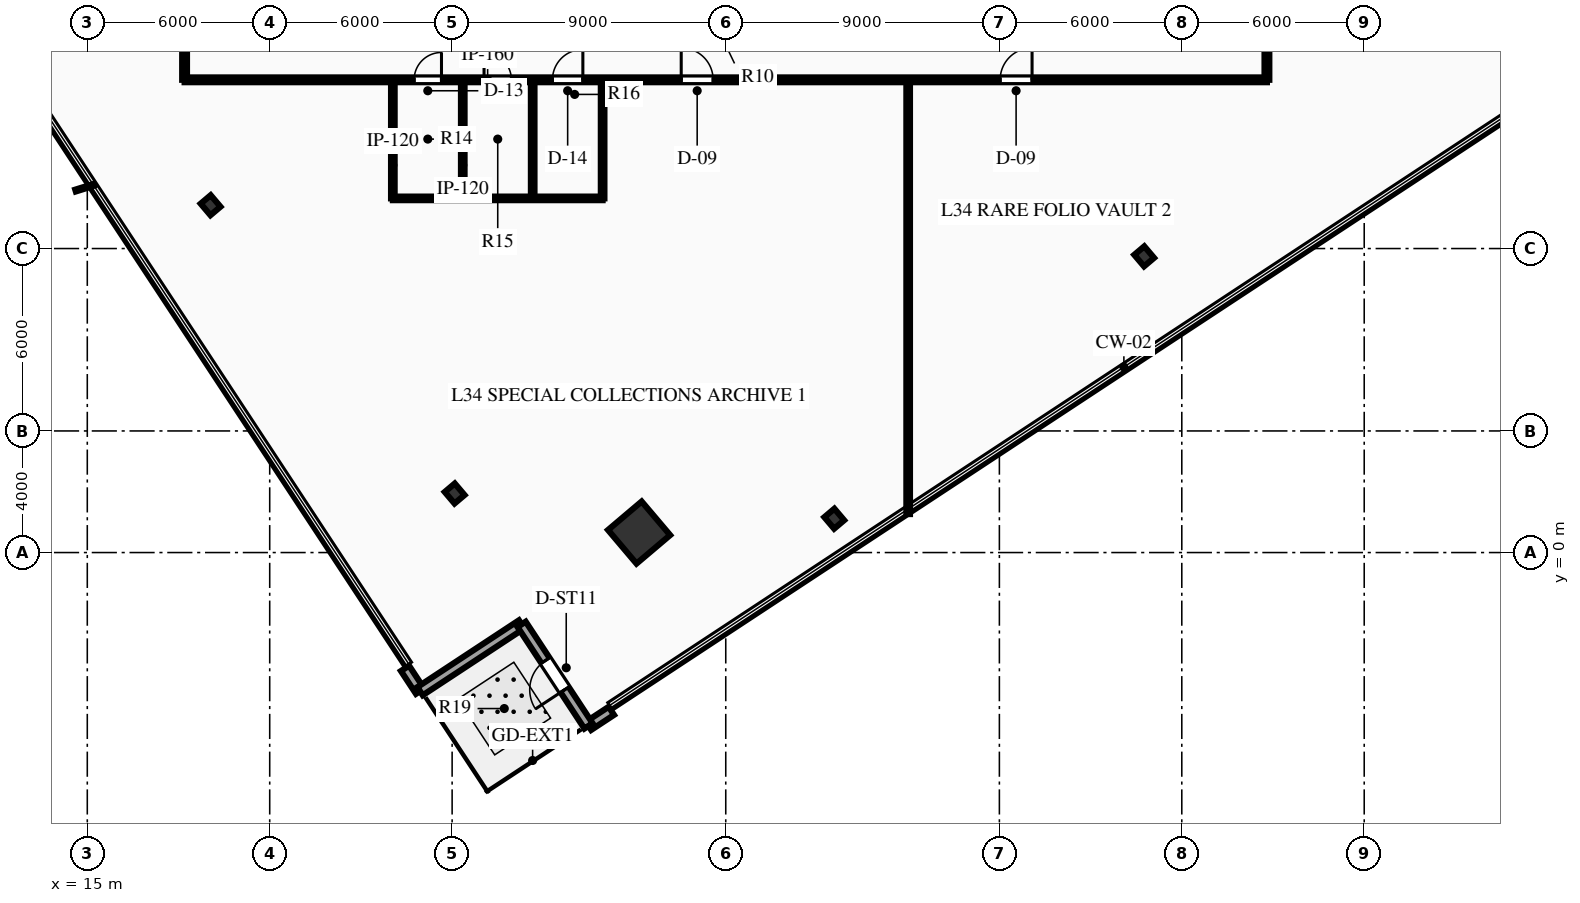
"""IFC4 building model, lengths in metres.
Left out: names, types, materials, properties, quantities, classifications, styles, units other than length and angle.
Written with IfcOpenShell. Run it as: python <this file> out.ifc"""

import sys

from ifc_helpers import new_model, si_unit, direction, frame, frame_2d, origin, origin_2d, place, context, subcontext, project, spatial, rectangle, hollow_rectangle, i_section, extrude, element, fill, save


model = new_model("IFC4")
c1 = context("Model", 3, precision=1e-05, world=origin(), true_north=direction((0.0, 1.0)))
c2 = subcontext(c1, "Body", "Model", "MODEL_VIEW")
j1 = project(units=[si_unit("LENGTHUNIT", "METRE"), si_unit("PLANEANGLEUNIT", "RADIAN")], contexts=[c1])
p1 = place(None, origin())
s1 = spatial("IfcSite", under=j1, at=p1, CompositionType="ELEMENT")
p2 = place(p1, origin())
s2 = spatial("IfcBuilding", under=s1, at=p2, CompositionType="ELEMENT")
p3 = place(p2, frame((0.0, 0.0, 140.7)))
s3 = spatial("IfcBuildingStorey", under=s2, at=p3, CompositionType="ELEMENT", Elevation=140.7)
p4 = place(p3, frame((33.149, 0.658, 0.0), z_axis=(0.0, 0.0, 1.0), x_axis=(0.763232469783, 0.646123979643, 0.0)))
e1 = element("IfcColumn", 1, at=p4, inside=s3, PredefinedType="COLUMN", context=c2, shape_type="SweptSolid", body=[
    extrude(hollow_rectangle(XDim=1.45, YDim=1.45, WallThickness=0.07, at=origin_2d()), origin(), (0.0, 0.0, 1.0), 3.75),
])
for number, where, z_axis, x_axis in (
    (2, (39.569, 1.114, 0.0), (0.0, 0.0, 1.0), (0.763, 0.646, 0.0)),
    (3, (49.762, 9.743, 0.0), (0.0, 0.0, 1.0), (0.763, 0.646, 0.0)),
    (4, (19.055, 11.426, 0.0), (0.0, 0.0, 1.0), (0.763, 0.646, 0.0)),
    (5, (27.083, 1.942, 0.0), (0.0, 0.0, 1.0), (0.763, 0.646, 0.0)),
):
    element("IfcColumn", number, at=place(p3, frame(where, z_axis=z_axis, x_axis=x_axis)), inside=s3, PredefinedType="COLUMN", context=c2, shape_type="SweptSolid", body=[
        extrude(i_section(OverallWidth=0.432, OverallDepth=0.498, WebThickness=0.056, FlangeThickness=0.089, at=origin_2d()), origin(), (0.0, 0.0, 1.0), 3.75),
    ])
for number, where, z_axis, x_axis in (
    (6, (32.237, -5.208, 0.0), (0.0, 0.0, 1.0), (-0.835, -0.55, 0.0)),
    (7, (25.945, -4.56, 0.0), (0.0, 0.0, 1.0), (-0.55, 0.835, 0.0)),
):
    element("IfcWall", number, at=place(p3, frame(where, z_axis=z_axis, x_axis=x_axis)), inside=s3, PredefinedType="STANDARD", context=c2, shape_type="SweptSolid", body=[
        extrude(rectangle(XDim=0.9, YDim=0.32, at=frame_2d((0.45, 0.0))), origin(), (0.0, 0.0, 1.0), 3.46),
    ])
p5 = place(p3, frame((29.286, -2.361, 0.0), z_axis=(0.0, 0.0, 1.0), x_axis=(-0.835331522158, -0.549746530767, 0.0)))
e8 = element("IfcWall", 8, at=p5, inside=s3, PredefinedType="STANDARD", context=c2, shape_type="SweptSolid", body=[
    extrude(rectangle(XDim=4.0, YDim=0.32, at=frame_2d((2.0, 0.0))), origin(), (0.0, 0.0, 1.0), 3.46),
])
p6 = place(p3, frame((31.485, -5.703, 0.0), z_axis=(0.0, 0.0, 1.0), x_axis=(-0.549746530767, 0.835331522158, 0.0)))
e9 = element("IfcWall", 9, at=p6, inside=s3, PredefinedType="STANDARD", context=c2, shape_type="SweptSolid", body=[
    extrude(rectangle(XDim=4.0, YDim=0.32, at=frame_2d((2.0, 0.0))), origin(), (0.0, 0.0, 1.0), 3.46),
])
p7 = place(p6, frame((1.425, 0.0, 0.0)))
e10 = element("IfcOpeningElement", 10, at=p7, cuts=e9, PredefinedType="OPENING", context=c2, shape_type="SweptSolid", body=[
    extrude(rectangle(XDim=1.15, YDim=2.2, at=frame_2d((0.575, 1.1))), frame((0.0, 0.17, 0.0), z_axis=(0.0, -1.0, 0.0), x_axis=(1.0, 0.0, 0.0)), (0.0, 0.0, 1.0), 0.34),
])
p8 = place(p3, frame((18.2, 15.55, 0.0), z_axis=(0.0, 0.0, 1.0), x_axis=(1.0, 0.0, 0.0)))
e11 = element("IfcWall", 11, at=p8, inside=s3, PredefinedType="PARTITIONING", context=c2, shape_type="SweptSolid", body=[
    extrude(rectangle(XDim=35.6, YDim=0.16, at=frame_2d((17.8, 0.0))), origin(), (0.0, 0.0, 1.0), 3.46),
])
p9 = place(p8, frame((7.55, 0.0, 0.0)))
e12 = element("IfcOpeningElement", 12, at=p9, cuts=e11, PredefinedType="OPENING", context=c2, shape_type="SweptSolid", body=[
    extrude(rectangle(XDim=0.9, YDim=2.15, at=frame_2d((0.45, 1.075))), frame((0.0, 0.09, 0.0), z_axis=(0.0, -1.0, 0.0), x_axis=(1.0, 0.0, 0.0)), (0.0, 0.0, 1.0), 0.18),
])
p10 = place(p8, frame((9.85, 0.0, 0.0)))
e13 = element("IfcOpeningElement", 13, at=p10, cuts=e11, PredefinedType="OPENING", context=c2, shape_type="SweptSolid", body=[
    extrude(rectangle(XDim=0.9, YDim=2.15, at=frame_2d((0.45, 1.075))), frame((0.0, 0.09, 0.0), z_axis=(0.0, -1.0, 0.0), x_axis=(1.0, 0.0, 0.0)), (0.0, 0.0, 1.0), 0.18),
])
p11 = place(p8, frame((12.1, 0.0, 0.0)))
e14 = element("IfcOpeningElement", 14, at=p11, cuts=e11, PredefinedType="OPENING", context=c2, shape_type="SweptSolid", body=[
    extrude(rectangle(XDim=1.0, YDim=2.15, at=frame_2d((0.5, 1.075))), frame((0.0, 0.09, 0.0), z_axis=(0.0, -1.0, 0.0), x_axis=(1.0, 0.0, 0.0)), (0.0, 0.0, 1.0), 0.18),
])
p12 = place(p8, frame((16.335, 0.0, 0.0)))
e15 = element("IfcOpeningElement", 15, at=p12, cuts=e11, PredefinedType="OPENING", context=c2, shape_type="SweptSolid", body=[
    extrude(rectangle(XDim=1.05, YDim=2.15, at=frame_2d((0.525, 1.075))), frame((0.0, 0.09, 0.0), z_axis=(0.0, -1.0, 0.0), x_axis=(1.0, 0.0, 0.0)), (0.0, 0.0, 1.0), 0.18),
])
p13 = place(p8, frame((26.825, 0.0, 0.0)))
e16 = element("IfcOpeningElement", 16, at=p13, cuts=e11, PredefinedType="OPENING", context=c2, shape_type="SweptSolid", body=[
    extrude(rectangle(XDim=1.05, YDim=2.15, at=frame_2d((0.525, 1.075))), frame((0.0, 0.09, 0.0), z_axis=(0.0, -1.0, 0.0), x_axis=(1.0, 0.0, 0.0)), (0.0, 0.0, 1.0), 0.18),
])
for number, where, z_axis, x_axis in (
    (17, (18.2, 15.55, 0.0), (0.0, 0.0, 1.0), (0.0, 1.0, 0.0)),
    (18, (53.8, 15.55, 0.0), (0.0, 0.0, 1.0), (0.0, 1.0, 0.0)),
):
    element("IfcWall", number, at=place(p3, frame(where, z_axis=z_axis, x_axis=x_axis)), inside=s3, PredefinedType="PARTITIONING", context=c2, shape_type="SweptSolid", body=[
        extrude(rectangle(XDim=2.3, YDim=0.16, at=frame_2d((1.15, 0.0))), origin(), (0.0, 0.0, 1.0), 3.46),
    ])
for number, where, z_axis, x_axis in (
    (19, (25.05, 11.65, 0.0), (0.0, 0.0, 1.0), (0.0, 1.0, 0.0)),
    (20, (27.35, 11.65, 0.0), (0.0, 0.0, 1.0), (0.0, 1.0, 0.0)),
    (21, (29.65, 11.65, 0.0), (0.0, 0.0, 1.0), (0.0, 1.0, 0.0)),
    (22, (31.95, 11.65, 0.0), (0.0, 0.0, 1.0), (0.0, 1.0, 0.0)),
):
    element("IfcWall", number, at=place(p3, frame(where, z_axis=z_axis, x_axis=x_axis)), inside=s3, PredefinedType="PARTITIONING", context=c2, shape_type="SweptSolid", body=[
        extrude(rectangle(XDim=3.9, YDim=0.12, at=frame_2d((1.95, 0.0))), origin(), (0.0, 0.0, 1.0), 3.46),
    ])
p14 = place(p3, frame((25.05, 11.65, 0.0), z_axis=(0.0, 0.0, 1.0), x_axis=(1.0, 0.0, 0.0)))
e23 = element("IfcWall", 23, at=p14, inside=s3, PredefinedType="PARTITIONING", context=c2, shape_type="SweptSolid", body=[
    extrude(rectangle(XDim=6.9, YDim=0.12, at=frame_2d((3.45, 0.0))), origin(), (0.0, 0.0, 1.0), 3.46),
])
p15 = place(p3, frame((42.0, 1.265, 0.0), z_axis=(0.0, 0.0, 1.0), x_axis=(0.0, 1.0, 0.0)))
e24 = element("IfcWall", 24, at=p15, inside=s3, PredefinedType="PARTITIONING", context=c2, shape_type="SweptSolid", body=[
    extrude(rectangle(XDim=14.285, YDim=0.12, at=frame_2d((7.142, 0.0))), origin(), (0.0, 0.0, 1.0), 3.46),
])
p16 = place(p7, origin())
e25 = element("IfcDoor", 25, at=p16, inside=s3, OperationType="SINGLE_SWING_LEFT", PredefinedType="DOOR", context=c2, shape_type="SweptSolid", body=[
    extrude(rectangle(XDim=1.15, YDim=2.2, at=frame_2d((0.575, 1.1))), frame((0.0, 0.025, 0.0), z_axis=(0.0, -1.0, 0.0), x_axis=(1.0, 0.0, 0.0)), (0.0, 0.0, 1.0), 0.05),
])
fill(e10, e25)
p17 = place(p9, origin())
e26 = element("IfcDoor", 26, at=p17, inside=s3, OperationType="SINGLE_SWING_RIGHT", PredefinedType="DOOR", context=c2, shape_type="SweptSolid", body=[
    extrude(rectangle(XDim=0.9, YDim=2.15, at=frame_2d((0.45, 1.075))), frame((0.0, 0.025, 0.0), z_axis=(0.0, -1.0, 0.0), x_axis=(1.0, 0.0, 0.0)), (0.0, 0.0, 1.0), 0.05),
])
fill(e12, e26)
p18 = place(p10, origin())
e27 = element("IfcDoor", 27, at=p18, inside=s3, OperationType="SINGLE_SWING_LEFT", PredefinedType="DOOR", context=c2, shape_type="SweptSolid", body=[
    extrude(rectangle(XDim=0.9, YDim=2.15, at=frame_2d((0.45, 1.075))), frame((0.0, 0.025, 0.0), z_axis=(0.0, -1.0, 0.0), x_axis=(1.0, 0.0, 0.0)), (0.0, 0.0, 1.0), 0.05),
])
fill(e13, e27)
p19 = place(p11, origin())
e28 = element("IfcDoor", 28, at=p19, inside=s3, OperationType="SINGLE_SWING_RIGHT", PredefinedType="DOOR", context=c2, shape_type="SweptSolid", body=[
    extrude(rectangle(XDim=1.0, YDim=2.15, at=frame_2d((0.5, 1.075))), frame((0.0, 0.025, 0.0), z_axis=(0.0, -1.0, 0.0), x_axis=(1.0, 0.0, 0.0)), (0.0, 0.0, 1.0), 0.05),
])
fill(e14, e28)
p20 = place(p12, origin())
e29 = element("IfcDoor", 29, at=p20, inside=s3, OperationType="SINGLE_SWING_LEFT", PredefinedType="DOOR", context=c2, shape_type="SweptSolid", body=[
    extrude(rectangle(XDim=1.05, YDim=2.15, at=frame_2d((0.525, 1.075))), frame((0.0, 0.025, 0.0), z_axis=(0.0, -1.0, 0.0), x_axis=(1.0, 0.0, 0.0)), (0.0, 0.0, 1.0), 0.05),
])
fill(e15, e29)
p21 = place(p13, origin())
e30 = element("IfcDoor", 30, at=p21, inside=s3, OperationType="SINGLE_SWING_RIGHT", PredefinedType="DOOR", context=c2, shape_type="SweptSolid", body=[
    extrude(rectangle(XDim=1.05, YDim=2.15, at=frame_2d((0.525, 1.075))), frame((0.0, 0.025, 0.0), z_axis=(0.0, -1.0, 0.0), x_axis=(1.0, 0.0, 0.0)), (0.0, 0.0, 1.0), 0.05),
])
fill(e16, e30)
save(model, sys.argv[1])
